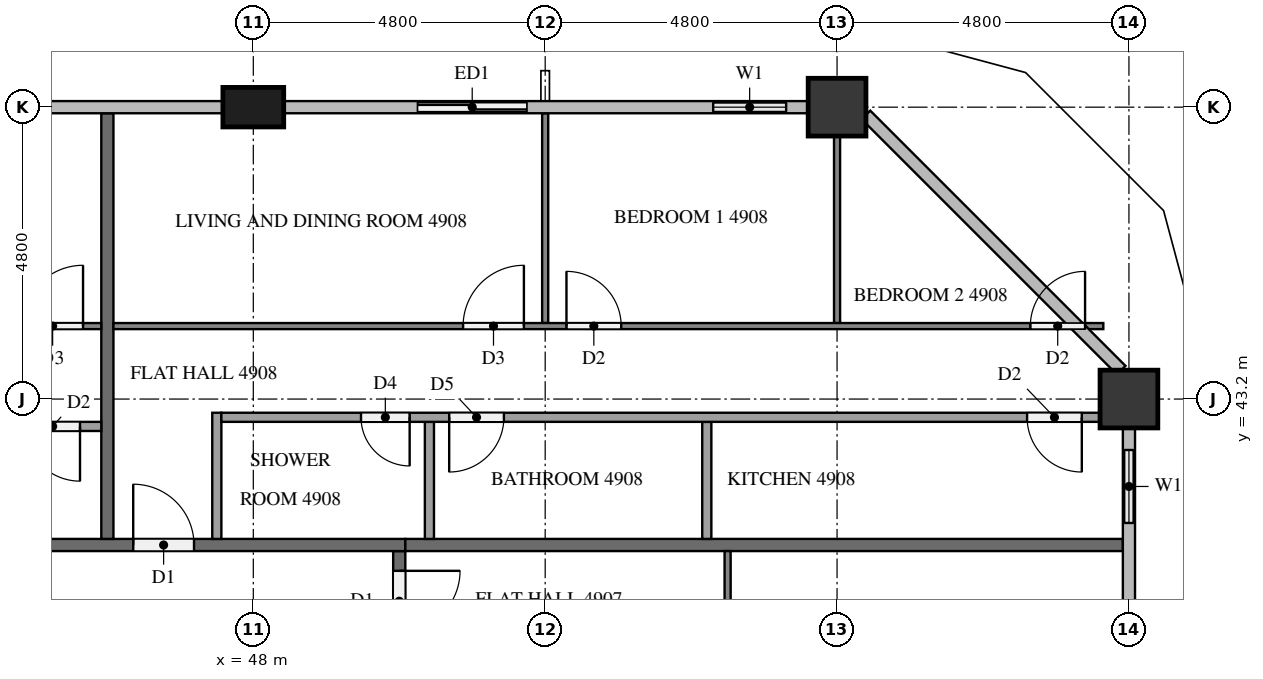
"""IFC4 building model, lengths in metres.
Left out: names, types, materials, properties, quantities, classifications, styles, units other than length and angle.
Written with IfcOpenShell. Run it as: python <this file> out.ifc"""

import sys

from ifc_helpers import new_model, si_unit, direction, frame, frame_2d, origin, origin_2d, place, context, subcontext, project, spatial, rectangle, extrude, element, fill, save


model = new_model("IFC4")
c1 = context("Model", 3, precision=1e-05, world=origin(), true_north=direction((0.0, 1.0)))
c2 = subcontext(c1, "Body", "Model", "MODEL_VIEW")
j1 = project(units=[si_unit("LENGTHUNIT", "METRE"), si_unit("PLANEANGLEUNIT", "RADIAN")], contexts=[c1])
p1 = place(None, origin())
s1 = spatial("IfcSite", under=j1, at=p1, CompositionType="ELEMENT")
p2 = place(p1, origin())
s2 = spatial("IfcBuilding", under=s1, at=p2, CompositionType="ELEMENT")
p3 = place(p2, frame((0.0, 0.0, 189.4)))
s3 = spatial("IfcBuildingStorey", under=s2, at=p3, CompositionType="ELEMENT", Elevation=189.4)
for number, where, z_axis, x_axis in (
    (1, (62.4, 43.2, 0.0), (0.0, 0.0, 1.0), (1.0, 0.0, 0.0)),
    (2, (57.6, 48.0, 0.0), (0.0, 0.0, 1.0), (1.0, 0.0, 0.0)),
):
    element("IfcColumn", number, at=place(p3, frame(where, z_axis=z_axis, x_axis=x_axis)), inside=s3, PredefinedType="COLUMN", context=c2, shape_type="SweptSolid", body=[
        extrude(rectangle(XDim=0.95, YDim=0.95, at=origin_2d()), origin(), (0.0, 0.0, 1.0), 3.2),
    ])
p4 = place(p3, frame((48.0, 48.0, 0.0), z_axis=(0.0, 0.0, 1.0), x_axis=(1.0, 0.0, 0.0)))
e3 = element("IfcColumn", 3, at=p4, inside=s3, PredefinedType="COLUMN", context=c2, shape_type="SweptSolid", body=[
    extrude(rectangle(XDim=1.0, YDim=0.65, at=origin_2d()), origin(), (0.0, 0.0, 1.0), 3.2),
])
p5 = place(p3, frame((62.4, 40.8, 0.0), z_axis=(0.0, 0.0, 1.0), x_axis=(0.0, 1.0, 0.0)))
e4 = element("IfcWall", 4, at=p5, inside=s3, PredefinedType="SOLIDWALL", context=c2, shape_type="SweptSolid", body=[
    extrude(rectangle(XDim=1.925, YDim=0.15, at=frame_2d((0.962, 0.0))), origin(), (0.0, 0.0, 1.0), 3.2),
])
p6 = place(p5, frame((0.363, 0.0, 0.9)))
e5 = element("IfcOpeningElement", 5, at=p6, cuts=e4, PredefinedType="OPENING", context=c2, shape_type="SweptSolid", body=[
    extrude(rectangle(XDim=1.2, YDim=1.4, at=frame_2d((0.6, 0.7))), frame((0.0, 0.085, 0.0), z_axis=(0.0, -1.0, 0.0), x_axis=(1.0, 0.0, 0.0)), (0.0, 0.0, 1.0), 0.17),
])
p7 = place(p3, frame((57.125, 48.0, 0.0), z_axis=(0.0, 0.0, 1.0), x_axis=(-1.0, 0.0, 0.0)))
e6 = element("IfcWall", 6, at=p7, inside=s3, PredefinedType="SOLIDWALL", context=c2, shape_type="SweptSolid", body=[
    extrude(rectangle(XDim=1.925, YDim=0.15, at=frame_2d((0.962, 0.0))), origin(), (0.0, 0.0, 1.0), 3.2),
])
p8 = place(p7, frame((0.363, 0.0, 0.9)))
e7 = element("IfcOpeningElement", 7, at=p8, cuts=e6, PredefinedType="OPENING", context=c2, shape_type="SweptSolid", body=[
    extrude(rectangle(XDim=1.2, YDim=1.4, at=frame_2d((0.6, 0.7))), frame((0.0, 0.085, 0.0), z_axis=(0.0, -1.0, 0.0), x_axis=(1.0, 0.0, 0.0)), (0.0, 0.0, 1.0), 0.17),
])
p9 = place(p3, frame((52.8, 48.0, 0.0), z_axis=(0.0, 0.0, 1.0), x_axis=(-1.0, 0.0, 0.0)))
e8 = element("IfcWall", 8, at=p9, inside=s3, PredefinedType="SOLIDWALL", context=c2, shape_type="SweptSolid", body=[
    extrude(rectangle(XDim=2.4, YDim=0.15, at=frame_2d((1.2, 0.0))), origin(), (0.0, 0.0, 1.0), 3.2),
])
p10 = place(p9, frame((0.3, 0.0, 0.0)))
e9 = element("IfcOpeningElement", 9, at=p10, cuts=e8, PredefinedType="OPENING", context=c2, shape_type="SweptSolid", body=[
    extrude(rectangle(XDim=1.8, YDim=2.4, at=frame_2d((0.9, 1.2))), frame((0.0, 0.085, 0.0), z_axis=(0.0, -1.0, 0.0), x_axis=(1.0, 0.0, 0.0)), (0.0, 0.0, 1.0), 0.17),
])
p11 = place(p3, frame((50.4, 40.7, 0.0), z_axis=(0.0, 0.0, 1.0), x_axis=(0.0, -1.0, 0.0)))
e10 = element("IfcWall", 10, at=p11, inside=s3, PredefinedType="PARTITIONING", context=c2, shape_type="SweptSolid", body=[
    extrude(rectangle(XDim=28.6, YDim=0.2, at=frame_2d((14.3, 0.0))), origin(), (0.0, 0.0, 1.0), 3.2),
])
p12 = place(p11, frame((21.925, 0.0, 0.0)))
e11 = element("IfcOpeningElement", 11, at=p12, cuts=e10, PredefinedType="OPENING", context=c2, shape_type="SweptSolid", body=[
    extrude(rectangle(XDim=1.0, YDim=2.1, at=frame_2d((0.5, 1.05))), frame((0.0, 0.11, 0.0), z_axis=(0.0, -1.0, 0.0), x_axis=(1.0, 0.0, 0.0)), (0.0, 0.0, 1.0), 0.22),
])
p13 = place(p11, frame((20.075, 0.0, 0.0)))
e12 = element("IfcOpeningElement", 12, at=p13, cuts=e10, PredefinedType="OPENING", context=c2, shape_type="SweptSolid", body=[
    extrude(rectangle(XDim=1.0, YDim=2.1, at=frame_2d((0.5, 1.05))), frame((0.0, 0.11, 0.0), z_axis=(0.0, -1.0, 0.0), x_axis=(1.0, 0.0, 0.0)), (0.0, 0.0, 1.0), 0.22),
])
p14 = place(p11, frame((0.325, 0.0, 0.0)))
e13 = element("IfcOpeningElement", 13, at=p14, cuts=e10, PredefinedType="OPENING", context=c2, shape_type="SweptSolid", body=[
    extrude(rectangle(XDim=1.0, YDim=2.1, at=frame_2d((0.5, 1.05))), frame((0.0, 0.11, 0.0), z_axis=(0.0, -1.0, 0.0), x_axis=(1.0, 0.0, 0.0)), (0.0, 0.0, 1.0), 0.22),
])
p15 = place(p3, frame((11.9, 40.8, 0.0), z_axis=(0.0, 0.0, 1.0), x_axis=(1.0, 0.0, 0.0)))
e14 = element("IfcWall", 14, at=p15, inside=s3, PredefinedType="PARTITIONING", context=c2, shape_type="SweptSolid", body=[
    extrude(rectangle(XDim=38.6, YDim=0.2, at=frame_2d((19.3, 0.0))), origin(), (0.0, 0.0, 1.0), 3.2),
])
p16 = place(p15, frame((34.125, 0.0, 0.0)))
e15 = element("IfcOpeningElement", 15, at=p16, cuts=e14, PredefinedType="OPENING", context=c2, shape_type="SweptSolid", body=[
    extrude(rectangle(XDim=1.0, YDim=2.1, at=frame_2d((0.5, 1.05))), frame((0.0, 0.11, 0.0), z_axis=(0.0, -1.0, 0.0), x_axis=(1.0, 0.0, 0.0)), (0.0, 0.0, 1.0), 0.22),
])
p17 = place(p15, frame((24.525, 0.0, 0.0)))
e16 = element("IfcOpeningElement", 16, at=p17, cuts=e14, PredefinedType="OPENING", context=c2, shape_type="SweptSolid", body=[
    extrude(rectangle(XDim=1.0, YDim=2.1, at=frame_2d((0.5, 1.05))), frame((0.0, 0.11, 0.0), z_axis=(0.0, -1.0, 0.0), x_axis=(1.0, 0.0, 0.0)), (0.0, 0.0, 1.0), 0.22),
])
p18 = place(p15, frame((7.725, 0.0, 0.0)))
e17 = element("IfcOpeningElement", 17, at=p18, cuts=e14, PredefinedType="OPENING", context=c2, shape_type="SweptSolid", body=[
    extrude(rectangle(XDim=1.0, YDim=2.1, at=frame_2d((0.5, 1.05))), frame((0.0, 0.11, 0.0), z_axis=(0.0, -1.0, 0.0), x_axis=(1.0, 0.0, 0.0)), (0.0, 0.0, 1.0), 0.22),
])
p19 = place(p15, frame((5.875, 0.0, 0.0)))
e18 = element("IfcOpeningElement", 18, at=p19, cuts=e14, PredefinedType="OPENING", context=c2, shape_type="SweptSolid", body=[
    extrude(rectangle(XDim=1.0, YDim=2.1, at=frame_2d((0.5, 1.05))), frame((0.0, 0.11, 0.0), z_axis=(0.0, -1.0, 0.0), x_axis=(1.0, 0.0, 0.0)), (0.0, 0.0, 1.0), 0.22),
])
p20 = place(p3, frame((50.5, 40.8, 0.0), z_axis=(0.0, 0.0, 1.0), x_axis=(1.0, 0.0, 0.0)))
e19 = element("IfcWall", 19, at=p20, inside=s3, PredefinedType="PARTITIONING", context=c2, shape_type="SweptSolid", body=[
    extrude(rectangle(XDim=11.8, YDim=0.2, at=frame_2d((5.9, 0.0))), origin(), (0.0, 0.0, 1.0), 3.2),
])
p21 = place(p3, frame((45.6, 47.9, 0.0), z_axis=(0.0, 0.0, 1.0), x_axis=(0.0, -1.0, 0.0)))
e20 = element("IfcWall", 20, at=p21, inside=s3, PredefinedType="PARTITIONING", context=c2, shape_type="SweptSolid", body=[
    extrude(rectangle(XDim=7.0, YDim=0.2, at=frame_2d((3.5, 0.0))), origin(), (0.0, 0.0, 1.0), 3.2),
])
p22 = place(p3, frame((55.8, 40.7, 0.0), z_axis=(0.0, 0.0, 1.0), x_axis=(0.0, -1.0, 0.0)))
e21 = element("IfcWall", 21, at=p22, inside=s3, PredefinedType="PARTITIONING", context=c2, shape_type="SweptSolid", body=[
    extrude(rectangle(XDim=14.2, YDim=0.1, at=frame_2d((7.1, 0.0))), origin(), (0.0, 0.0, 1.0), 3.2),
])
p23 = place(p22, frame((3.45, 0.0, 0.0)))
e22 = element("IfcOpeningElement", 22, at=p23, cuts=e21, PredefinedType="OPENING", context=c2, shape_type="SweptSolid", body=[
    extrude(rectangle(XDim=0.9, YDim=2.1, at=frame_2d((0.45, 1.05))), frame((0.0, 0.06, 0.0), z_axis=(0.0, -1.0, 0.0), x_axis=(1.0, 0.0, 0.0)), (0.0, 0.0, 1.0), 0.12),
])
p24 = place(p22, frame((5.05, 0.0, 0.0)))
e23 = element("IfcOpeningElement", 23, at=p24, cuts=e21, PredefinedType="OPENING", context=c2, shape_type="SweptSolid", body=[
    extrude(rectangle(XDim=1.0, YDim=2.1, at=frame_2d((0.5, 1.05))), frame((0.0, 0.06, 0.0), z_axis=(0.0, -1.0, 0.0), x_axis=(1.0, 0.0, 0.0)), (0.0, 0.0, 1.0), 0.12),
])
p25 = place(p22, frame((13.0, 0.0, 0.0)))
e24 = element("IfcOpeningElement", 24, at=p25, cuts=e21, PredefinedType="OPENING", context=c2, shape_type="SweptSolid", body=[
    extrude(rectangle(XDim=0.9, YDim=2.1, at=frame_2d((0.45, 1.05))), frame((0.0, 0.06, 0.0), z_axis=(0.0, -1.0, 0.0), x_axis=(1.0, 0.0, 0.0)), (0.0, 0.0, 1.0), 0.12),
])
p26 = place(p3, frame((52.8, 44.45, 0.0), z_axis=(0.0, 0.0, 1.0), x_axis=(0.0, 1.0, 0.0)))
e25 = element("IfcWall", 25, at=p26, inside=s3, PredefinedType="PARTITIONING", context=c2, shape_type="SweptSolid", body=[
    extrude(rectangle(XDim=3.45, YDim=0.1, at=frame_2d((1.725, 0.0))), origin(), (0.0, 0.0, 1.0), 3.2),
])
p27 = place(p3, frame((57.6, 44.45, 0.0), z_axis=(0.0, 0.0, 1.0), x_axis=(0.0, 1.0, 0.0)))
e26 = element("IfcWall", 26, at=p27, inside=s3, PredefinedType="PARTITIONING", context=c2, shape_type="SweptSolid", body=[
    extrude(rectangle(XDim=3.075, YDim=0.1, at=frame_2d((1.538, 0.0))), origin(), (0.0, 0.0, 1.0), 3.2),
])
p28 = place(p3, frame((45.7, 44.4, 0.0), z_axis=(0.0, 0.0, 1.0), x_axis=(1.0, 0.0, 0.0)))
e27 = element("IfcWall", 27, at=p28, inside=s3, PredefinedType="PARTITIONING", context=c2, shape_type="SweptSolid", body=[
    extrude(rectangle(XDim=16.279, YDim=0.1, at=frame_2d((8.139, 0.0))), origin(), (0.0, 0.0, 1.0), 3.2),
])
p29 = place(p28, frame((5.75, 0.0, 0.0)))
e28 = element("IfcOpeningElement", 28, at=p29, cuts=e27, PredefinedType="OPENING", context=c2, shape_type="SweptSolid", body=[
    extrude(rectangle(XDim=1.0, YDim=2.1, at=frame_2d((0.5, 1.05))), frame((0.0, 0.06, 0.0), z_axis=(0.0, -1.0, 0.0), x_axis=(1.0, 0.0, 0.0)), (0.0, 0.0, 1.0), 0.12),
])
p30 = place(p28, frame((7.45, 0.0, 0.0)))
e29 = element("IfcOpeningElement", 29, at=p30, cuts=e27, PredefinedType="OPENING", context=c2, shape_type="SweptSolid", body=[
    extrude(rectangle(XDim=0.9, YDim=2.1, at=frame_2d((0.45, 1.05))), frame((0.0, 0.06, 0.0), z_axis=(0.0, -1.0, 0.0), x_axis=(1.0, 0.0, 0.0)), (0.0, 0.0, 1.0), 0.12),
])
p31 = place(p28, frame((15.079, 0.0, 0.0)))
e30 = element("IfcOpeningElement", 30, at=p31, cuts=e27, PredefinedType="OPENING", context=c2, shape_type="SweptSolid", body=[
    extrude(rectangle(XDim=0.9, YDim=2.1, at=frame_2d((0.45, 1.05))), frame((0.0, 0.06, 0.0), z_axis=(0.0, -1.0, 0.0), x_axis=(1.0, 0.0, 0.0)), (0.0, 0.0, 1.0), 0.12),
])
for number, where, z_axis, x_axis in (
    (31, (50.896, 40.9, 0.0), (0.0, 0.0, 1.0), (0.0, 1.0, 0.0)),
    (32, (55.458, 40.9, 0.0), (0.0, 0.0, 1.0), (0.0, 1.0, 0.0)),
):
    element("IfcWall", number, at=place(p3, frame(where, z_axis=z_axis, x_axis=x_axis)), inside=s3, PredefinedType="PARTITIONING", context=c2, shape_type="SweptSolid", body=[
        extrude(rectangle(XDim=1.925, YDim=0.15, at=frame_2d((0.962, 0.0))), origin(), (0.0, 0.0, 1.0), 3.2),
    ])
p32 = place(p3, frame((47.4, 40.9, 0.0), z_axis=(0.0, 0.0, 1.0), x_axis=(0.0, 1.0, 0.0)))
e33 = element("IfcWall", 33, at=p32, inside=s3, PredefinedType="PARTITIONING", context=c2, shape_type="SweptSolid", body=[
    extrude(rectangle(XDim=2.075, YDim=0.15, at=frame_2d((1.038, 0.0))), origin(), (0.0, 0.0, 1.0), 3.2),
])
p33 = place(p3, frame((61.925, 42.9, 0.0), z_axis=(0.0, 0.0, 1.0), x_axis=(-1.0, 0.0, 0.0)))
e34 = element("IfcWall", 34, at=p33, inside=s3, PredefinedType="PARTITIONING", context=c2, shape_type="SweptSolid", body=[
    extrude(rectangle(XDim=14.45, YDim=0.15, at=frame_2d((7.225, 0.0))), origin(), (0.0, 0.0, 1.0), 3.2),
])
p34 = place(p33, frame((11.354, 0.0, 0.0)))
e35 = element("IfcOpeningElement", 35, at=p34, cuts=e34, PredefinedType="OPENING", context=c2, shape_type="SweptSolid", body=[
    extrude(rectangle(XDim=0.8, YDim=2.1, at=frame_2d((0.4, 1.05))), frame((0.0, 0.085, 0.0), z_axis=(0.0, -1.0, 0.0), x_axis=(1.0, 0.0, 0.0)), (0.0, 0.0, 1.0), 0.17),
])
p35 = place(p33, frame((9.804, 0.0, 0.0)))
e36 = element("IfcOpeningElement", 36, at=p35, cuts=e34, PredefinedType="OPENING", context=c2, shape_type="SweptSolid", body=[
    extrude(rectangle(XDim=0.9, YDim=2.1, at=frame_2d((0.45, 1.05))), frame((0.0, 0.085, 0.0), z_axis=(0.0, -1.0, 0.0), x_axis=(1.0, 0.0, 0.0)), (0.0, 0.0, 1.0), 0.17),
])
p36 = place(p33, frame((0.3, 0.0, 0.0)))
e37 = element("IfcOpeningElement", 37, at=p36, cuts=e34, PredefinedType="OPENING", context=c2, shape_type="SweptSolid", body=[
    extrude(rectangle(XDim=0.9, YDim=2.1, at=frame_2d((0.45, 1.05))), frame((0.0, 0.085, 0.0), z_axis=(0.0, -1.0, 0.0), x_axis=(1.0, 0.0, 0.0)), (0.0, 0.0, 1.0), 0.17),
])
p37 = place(p3, frame((36.1, 44.4, 0.0), z_axis=(0.0, 0.0, 1.0), x_axis=(1.0, 0.0, 0.0)))
e38 = element("IfcWall", 38, at=p37, inside=s3, PredefinedType="PARTITIONING", context=c2, shape_type="SweptSolid", body=[
    extrude(rectangle(XDim=9.4, YDim=0.1, at=frame_2d((4.7, 0.0))), origin(), (0.0, 0.0, 1.0), 3.2),
])
p38 = place(p37, frame((0.3, 0.0, 0.0)))
e39 = element("IfcOpeningElement", 39, at=p38, cuts=e38, PredefinedType="OPENING", context=c2, shape_type="SweptSolid", body=[
    extrude(rectangle(XDim=0.9, YDim=2.1, at=frame_2d((0.45, 1.05))), frame((0.0, 0.06, 0.0), z_axis=(0.0, -1.0, 0.0), x_axis=(1.0, 0.0, 0.0)), (0.0, 0.0, 1.0), 0.12),
])
p39 = place(p37, frame((8.1, 0.0, 0.0)))
e40 = element("IfcOpeningElement", 40, at=p39, cuts=e38, PredefinedType="OPENING", context=c2, shape_type="SweptSolid", body=[
    extrude(rectangle(XDim=1.0, YDim=2.1, at=frame_2d((0.5, 1.05))), frame((0.0, 0.06, 0.0), z_axis=(0.0, -1.0, 0.0), x_axis=(1.0, 0.0, 0.0)), (0.0, 0.0, 1.0), 0.12),
])
p40 = place(p3, frame((45.5, 42.75, 0.0), z_axis=(0.0, 0.0, 1.0), x_axis=(-1.0, 0.0, 0.0)))
e41 = element("IfcWall", 41, at=p40, inside=s3, PredefinedType="PARTITIONING", context=c2, shape_type="SweptSolid", body=[
    extrude(rectangle(XDim=7.625, YDim=0.15, at=frame_2d((3.812, 0.0))), origin(), (0.0, 0.0, 1.0), 3.2),
])
p41 = place(p40, frame((6.525, 0.0, 0.0)))
e42 = element("IfcOpeningElement", 42, at=p41, cuts=e41, PredefinedType="OPENING", context=c2, shape_type="SweptSolid", body=[
    extrude(rectangle(XDim=0.8, YDim=2.1, at=frame_2d((0.4, 1.05))), frame((0.0, 0.085, 0.0), z_axis=(0.0, -1.0, 0.0), x_axis=(1.0, 0.0, 0.0)), (0.0, 0.0, 1.0), 0.17),
])
p42 = place(p40, frame((0.35, 0.0, 0.0)))
e43 = element("IfcOpeningElement", 43, at=p42, cuts=e41, PredefinedType="OPENING", context=c2, shape_type="SweptSolid", body=[
    extrude(rectangle(XDim=0.9, YDim=2.1, at=frame_2d((0.45, 1.05))), frame((0.0, 0.085, 0.0), z_axis=(0.0, -1.0, 0.0), x_axis=(1.0, 0.0, 0.0)), (0.0, 0.0, 1.0), 0.17),
])
p43 = place(p6, origin())
e44 = element("IfcWindow", 44, at=p43, inside=s3, PartitioningType="SINGLE_PANEL", PredefinedType="WINDOW", context=c2, shape_type="SweptSolid", body=[
    extrude(rectangle(XDim=1.2, YDim=1.4, at=frame_2d((0.6, 0.7))), frame((0.0, 0.03, 0.0), z_axis=(0.0, -1.0, 0.0), x_axis=(1.0, 0.0, 0.0)), (0.0, 0.0, 1.0), 0.06),
])
fill(e5, e44)
p44 = place(p8, origin())
e45 = element("IfcWindow", 45, at=p44, inside=s3, PartitioningType="SINGLE_PANEL", PredefinedType="WINDOW", context=c2, shape_type="SweptSolid", body=[
    extrude(rectangle(XDim=1.2, YDim=1.4, at=frame_2d((0.6, 0.7))), frame((0.0, 0.03, 0.0), z_axis=(0.0, -1.0, 0.0), x_axis=(1.0, 0.0, 0.0)), (0.0, 0.0, 1.0), 0.06),
])
fill(e7, e45)
p45 = place(p10, origin())
e46 = element("IfcDoor", 46, at=p45, inside=s3, OperationType="SLIDING_TO_LEFT", PredefinedType="DOOR", context=c2, shape_type="SweptSolid", body=[
    extrude(rectangle(XDim=1.8, YDim=2.4, at=frame_2d((0.9, 1.2))), frame((0.0, 0.025, 0.0), z_axis=(0.0, -1.0, 0.0), x_axis=(1.0, 0.0, 0.0)), (0.0, 0.0, 1.0), 0.05),
])
fill(e9, e46)
p46 = place(p14, origin())
e47 = element("IfcDoor", 47, at=p46, inside=s3, OperationType="SINGLE_SWING_LEFT", PredefinedType="DOOR", context=c2, shape_type="SweptSolid", body=[
    extrude(rectangle(XDim=1.0, YDim=2.1, at=frame_2d((0.5, 1.05))), frame((0.0, 0.025, 0.0), z_axis=(0.0, -1.0, 0.0), x_axis=(1.0, 0.0, 0.0)), (0.0, 0.0, 1.0), 0.05),
])
fill(e13, e47)
p47 = place(p16, origin())
e48 = element("IfcDoor", 48, at=p47, inside=s3, OperationType="SINGLE_SWING_LEFT", PredefinedType="DOOR", context=c2, shape_type="SweptSolid", body=[
    extrude(rectangle(XDim=1.0, YDim=2.1, at=frame_2d((0.5, 1.05))), frame((0.0, 0.025, 0.0), z_axis=(0.0, -1.0, 0.0), x_axis=(1.0, 0.0, 0.0)), (0.0, 0.0, 1.0), 0.05),
])
fill(e15, e48)
p48 = place(p29, origin())
e49 = element("IfcDoor", 49, at=p48, inside=s3, OperationType="SINGLE_SWING_RIGHT", PredefinedType="DOOR", context=c2, shape_type="SweptSolid", body=[
    extrude(rectangle(XDim=1.0, YDim=2.1, at=frame_2d((0.5, 1.05))), frame((0.0, 0.025, 0.0), z_axis=(0.0, -1.0, 0.0), x_axis=(1.0, 0.0, 0.0)), (0.0, 0.0, 1.0), 0.05),
])
fill(e28, e49)
p49 = place(p30, origin())
e50 = element("IfcDoor", 50, at=p49, inside=s3, OperationType="SINGLE_SWING_LEFT", PredefinedType="DOOR", context=c2, shape_type="SweptSolid", body=[
    extrude(rectangle(XDim=0.9, YDim=2.1, at=frame_2d((0.45, 1.05))), frame((0.0, 0.025, 0.0), z_axis=(0.0, -1.0, 0.0), x_axis=(1.0, 0.0, 0.0)), (0.0, 0.0, 1.0), 0.05),
])
fill(e29, e50)
p50 = place(p31, origin())
e51 = element("IfcDoor", 51, at=p50, inside=s3, OperationType="SINGLE_SWING_RIGHT", PredefinedType="DOOR", context=c2, shape_type="SweptSolid", body=[
    extrude(rectangle(XDim=0.9, YDim=2.1, at=frame_2d((0.45, 1.05))), frame((0.0, 0.025, 0.0), z_axis=(0.0, -1.0, 0.0), x_axis=(1.0, 0.0, 0.0)), (0.0, 0.0, 1.0), 0.05),
])
fill(e30, e51)
p51 = place(p34, origin())
e52 = element("IfcDoor", 52, at=p51, inside=s3, OperationType="SINGLE_SWING_LEFT", PredefinedType="DOOR", context=c2, shape_type="SweptSolid", body=[
    extrude(rectangle(XDim=0.8, YDim=2.1, at=frame_2d((0.4, 1.05))), frame((0.0, 0.025, 0.0), z_axis=(0.0, -1.0, 0.0), x_axis=(1.0, 0.0, 0.0)), (0.0, 0.0, 1.0), 0.05),
])
fill(e35, e52)
p52 = place(p35, origin())
e53 = element("IfcDoor", 53, at=p52, inside=s3, OperationType="SINGLE_SWING_RIGHT", PredefinedType="DOOR", context=c2, shape_type="SweptSolid", body=[
    extrude(rectangle(XDim=0.9, YDim=2.1, at=frame_2d((0.45, 1.05))), frame((0.0, 0.025, 0.0), z_axis=(0.0, -1.0, 0.0), x_axis=(1.0, 0.0, 0.0)), (0.0, 0.0, 1.0), 0.05),
])
fill(e36, e53)
p53 = place(p36, origin())
e54 = element("IfcDoor", 54, at=p53, inside=s3, OperationType="SINGLE_SWING_LEFT", PredefinedType="DOOR", context=c2, shape_type="SweptSolid", body=[
    extrude(rectangle(XDim=0.9, YDim=2.1, at=frame_2d((0.45, 1.05))), frame((0.0, 0.025, 0.0), z_axis=(0.0, -1.0, 0.0), x_axis=(1.0, 0.0, 0.0)), (0.0, 0.0, 1.0), 0.05),
])
fill(e37, e54)
p54 = place(p39, origin())
e55 = element("IfcDoor", 55, at=p54, inside=s3, OperationType="SINGLE_SWING_RIGHT", PredefinedType="DOOR", context=c2, shape_type="SweptSolid", body=[
    extrude(rectangle(XDim=1.0, YDim=2.1, at=frame_2d((0.5, 1.05))), frame((0.0, 0.025, 0.0), z_axis=(0.0, -1.0, 0.0), x_axis=(1.0, 0.0, 0.0)), (0.0, 0.0, 1.0), 0.05),
])
fill(e40, e55)
p55 = place(p42, origin())
e56 = element("IfcDoor", 56, at=p55, inside=s3, OperationType="SINGLE_SWING_LEFT", PredefinedType="DOOR", context=c2, shape_type="SweptSolid", body=[
    extrude(rectangle(XDim=0.9, YDim=2.1, at=frame_2d((0.45, 1.05))), frame((0.0, 0.025, 0.0), z_axis=(0.0, -1.0, 0.0), x_axis=(1.0, 0.0, 0.0)), (0.0, 0.0, 1.0), 0.05),
])
fill(e43, e56)
save(model, sys.argv[1])
